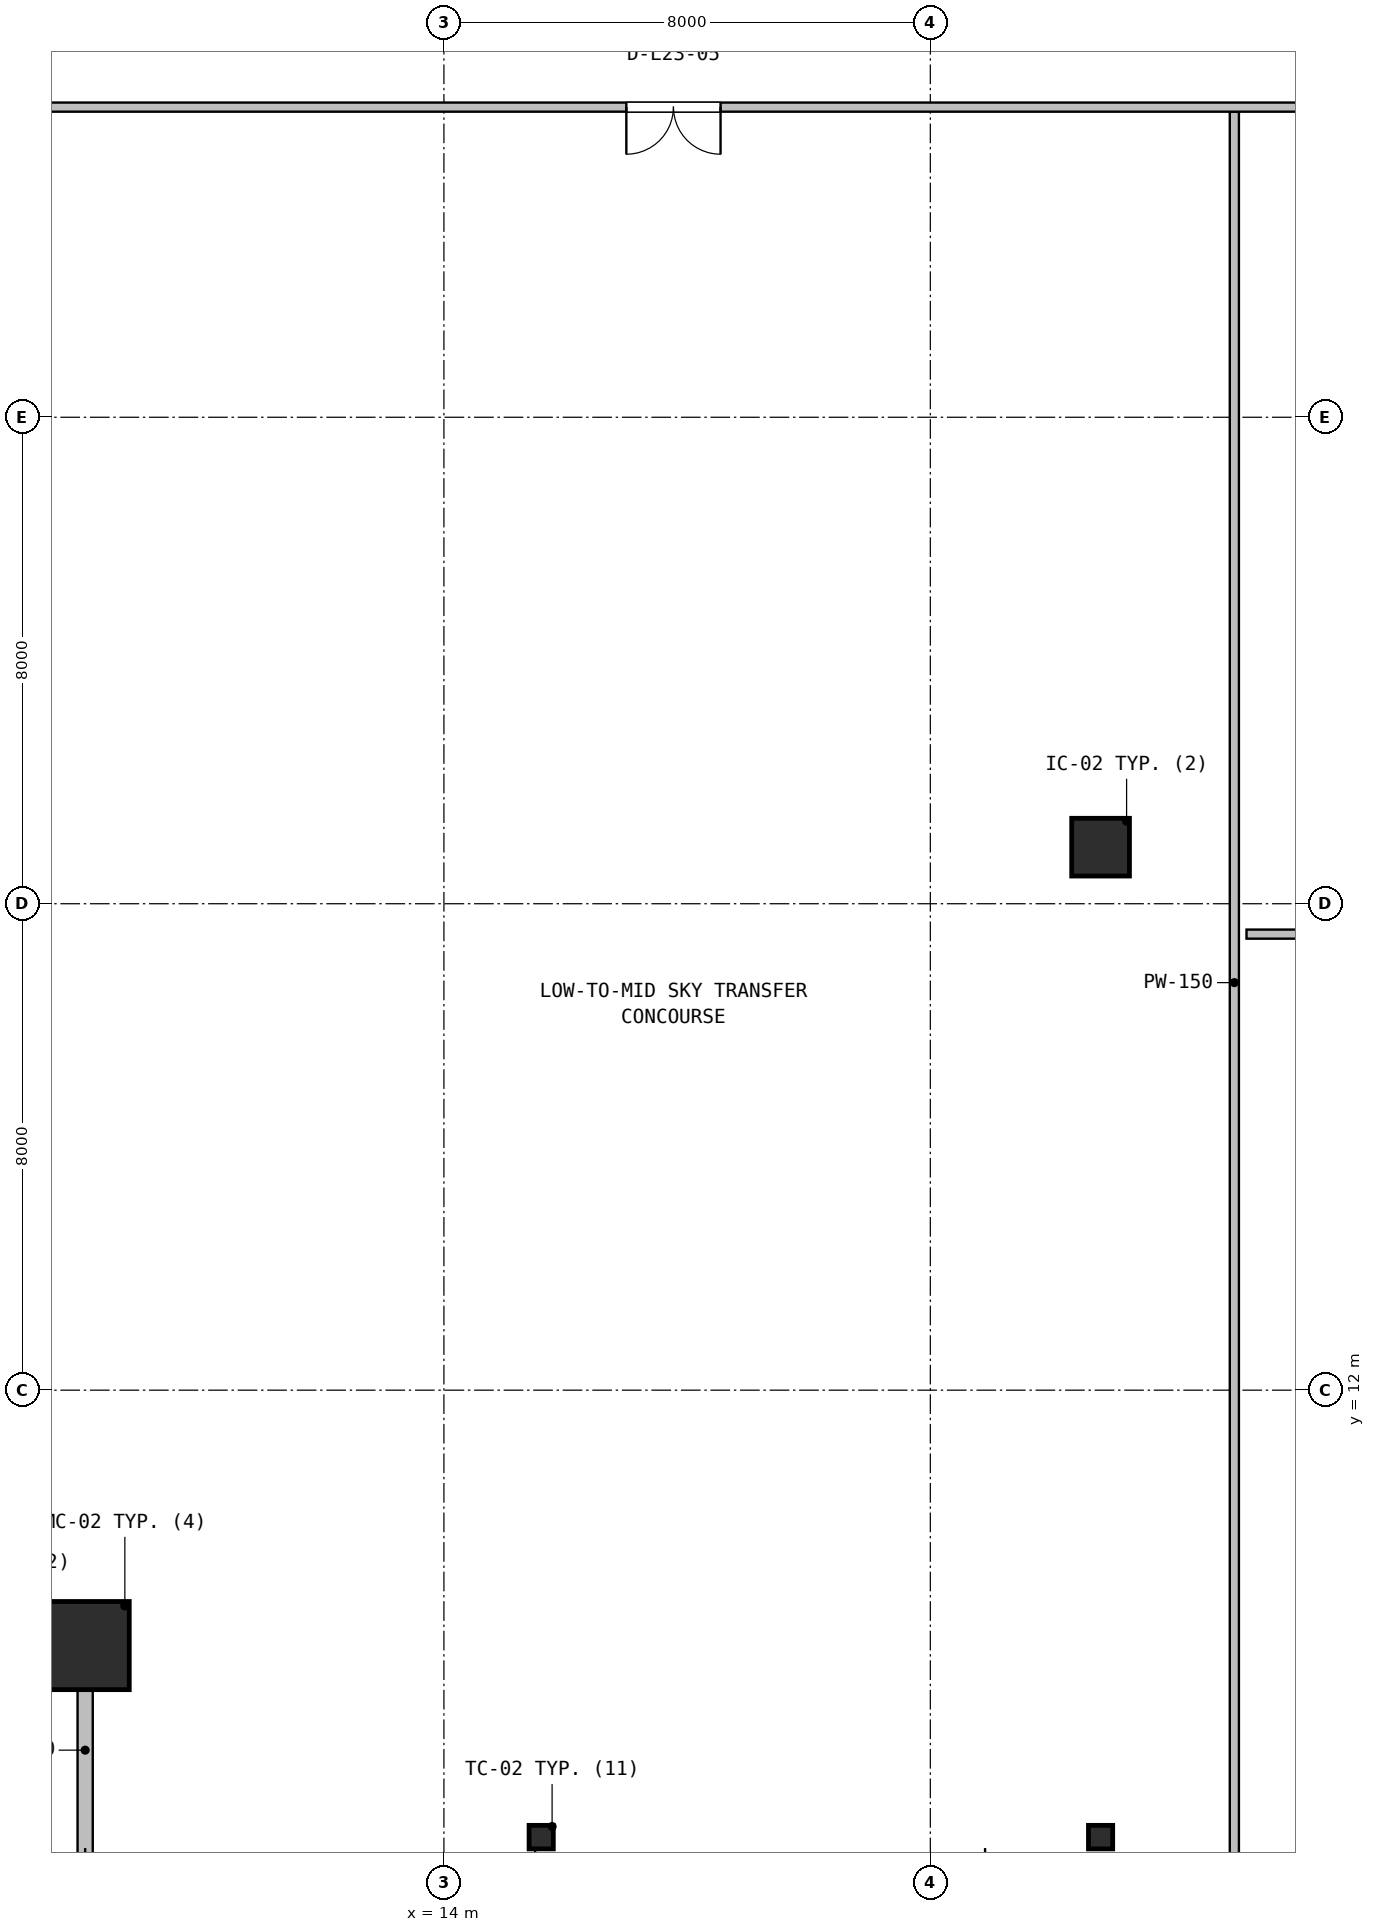
"""IFC4 building model, lengths in metres.
Left out: names, types, materials, properties, quantities, classifications, styles, units other than length and angle.
Written with IfcOpenShell. Run it as: python <this file> out.ifc"""

import sys

from ifc_helpers import new_model, si_unit, direction, frame, frame_2d, origin, origin_2d, place, context, subcontext, project, spatial, rectangle, hollow_rectangle, i_section, extrude, source, transform, mapped, element, fill, save


model = new_model("IFC4")
c1 = context("Model", 3, precision=1e-05, world=origin(), true_north=direction((0.0, 1.0)))
c2 = subcontext(c1, "Body", "Model", "MODEL_VIEW")
j1 = project(units=[si_unit("LENGTHUNIT", "METRE"), si_unit("PLANEANGLEUNIT", "RADIAN")], contexts=[c1])
p1 = place(None, origin())
s1 = spatial("IfcSite", under=j1, at=p1, CompositionType="ELEMENT")
p2 = place(p1, origin())
s2 = spatial("IfcBuilding", under=s1, at=p2, CompositionType="ELEMENT")
p3 = place(p2, frame((0.0, 0.0, 98.4)))
s3 = spatial("IfcBuildingStorey", under=s2, at=p3, CompositionType="ELEMENT", Elevation=98.4)
m1 = source(origin(), c2, "Body", "SweptSolid", [
    extrude(hollow_rectangle(XDim=1.45, YDim=1.45, WallThickness=0.055, at=origin_2d()), origin(), (0.0, 0.0, 1.0), 4.6),
])
p4 = place(p3, frame((8.1, 7.8, 0.0), z_axis=(0.0, 0.0, 1.0), x_axis=(1.0, 0.0, 0.0)))
e1 = element("IfcColumn", 1, at=p4, inside=s3, PredefinedType="COLUMN", context=c2, shape_type="MappedRepresentation", body=[
    mapped(m1, transform((0.0, 0.0, 0.0), x_axis=(1.0, 0.0, 0.0), y_axis=(0.0, 1.0, 0.0), z_axis=(0.0, 0.0, 1.0), scale=1.0)),
])
m2 = source(origin(), c2, "Body", "SweptSolid", [
    extrude(i_section(OverallWidth=0.398, OverallDepth=0.387, WebThickness=0.021, FlangeThickness=0.033, FilletRadius=0.018, at=origin_2d()), origin(), (0.0, 0.0, 1.0), 4.6),
])
for number, where, z_axis, x_axis in (
    (2, (15.6, 4.65, 0.0), (0.0, 0.0, 1.0), (1.0, 0.0, 0.0)),
    (3, (24.8, 4.65, 0.0), (0.0, 0.0, 1.0), (1.0, 0.0, 0.0)),
):
    element("IfcColumn", number, at=place(p3, frame(where, z_axis=z_axis, x_axis=x_axis)), inside=s3, PredefinedType="COLUMN", context=c2, shape_type="MappedRepresentation", body=[
        mapped(m2, transform((0.0, 0.0, 0.0), x_axis=(1.0, 0.0, 0.0), y_axis=(0.0, 1.0, 0.0), z_axis=(0.0, 0.0, 1.0), scale=1.0)),
    ])
m3 = source(origin(), c2, "Body", "SweptSolid", [
    extrude(rectangle(XDim=0.95, YDim=0.95, at=origin_2d()), origin(), (0.0, 0.0, 1.0), 4.6),
])
p5 = place(p3, frame((24.8, 20.93, 0.0), z_axis=(0.0, 0.0, 1.0), x_axis=(1.0, 0.0, 0.0)))
e4 = element("IfcColumn", 4, at=p5, inside=s3, PredefinedType="COLUMN", context=c2, shape_type="MappedRepresentation", body=[
    mapped(m3, transform((0.0, 0.0, 0.0), x_axis=(1.0, 0.0, 0.0), y_axis=(0.0, 1.0, 0.0), z_axis=(0.0, 0.0, 1.0), scale=1.0)),
])
p6 = place(p3, frame((8.1, 4.28, 0.0), z_axis=(0.0, 0.0, 1.0), x_axis=(0.0, 1.0, 0.0)))
e5 = element("IfcWall", 5, at=p6, inside=s3, PredefinedType="SOLIDWALL", context=c2, shape_type="SweptSolid", body=[
    extrude(rectangle(XDim=3.6, YDim=0.25, at=frame_2d((1.8, 0.0))), origin(), (0.0, 0.0, 1.0), 3.908),
])
p7 = place(p3, frame((27.0, 4.38, 0.0), z_axis=(0.0, 0.0, 1.0), x_axis=(0.0, 1.0, 0.0)))
e6 = element("IfcWall", 6, at=p7, inside=s3, PredefinedType="PARTITIONING", context=c2, shape_type="SweptSolid", body=[
    extrude(rectangle(XDim=28.645, YDim=0.15, at=frame_2d((14.323, 0.0))), origin(), (0.0, 0.0, 1.0), 3.63),
])
p8 = place(p3, frame((4.68, 33.1, 0.0), z_axis=(0.0, 0.0, 1.0), x_axis=(1.0, 0.0, 0.0)))
e7 = element("IfcWall", 7, at=p8, inside=s3, PredefinedType="PARTITIONING", context=c2, shape_type="SweptSolid", body=[
    extrude(rectangle(XDim=34.92, YDim=0.15, at=frame_2d((17.46, 0.0))), origin(), (0.0, 0.0, 1.0), 3.63),
])
p9 = place(p8, frame((12.32, 0.0, 0.0)))
e8 = element("IfcOpeningElement", 8, at=p9, cuts=e7, PredefinedType="OPENING", context=c2, shape_type="SweptSolid", body=[
    extrude(rectangle(XDim=1.55, YDim=2.12, at=frame_2d((0.775, 1.06))), frame((0.0, 0.085, 0.0), z_axis=(0.0, -1.0, 0.0), x_axis=(1.0, 0.0, 0.0)), (0.0, 0.0, 1.0), 0.17),
])
p10 = place(p3, frame((27.2, 19.5, 0.0), z_axis=(0.0, 0.0, 1.0), x_axis=(1.0, 0.0, 0.0)))
e9 = element("IfcWall", 9, at=p10, inside=s3, PredefinedType="PARTITIONING", context=c2, shape_type="SweptSolid", body=[
    extrude(rectangle(XDim=12.4, YDim=0.15, at=frame_2d((6.2, 0.0))), origin(), (0.0, 0.0, 1.0), 3.63),
])
m4 = source(origin(), c2, "Body", "SweptSolid", [
    extrude(rectangle(XDim=1.55, YDim=2.12, at=frame_2d((0.775, 1.06))), frame((0.0, 0.025, 0.0), z_axis=(0.0, -1.0, 0.0), x_axis=(1.0, 0.0, 0.0)), (0.0, 0.0, 1.0), 0.05),
])
p11 = place(p9, frame((1.55, 0.0, 0.0), z_axis=(0.0, 0.0, 1.0), x_axis=(-1.0, 0.0, 0.0)))
e10 = element("IfcDoor", 10, at=p11, inside=s3, OperationType="DOUBLE_DOOR_SINGLE_SWING", PredefinedType="DOOR", context=c2, shape_type="MappedRepresentation", body=[
    mapped(m4, transform((0.0, 0.0, 0.0), x_axis=(1.0, 0.0, 0.0), y_axis=(0.0, 1.0, 0.0), z_axis=(0.0, 0.0, 1.0), scale=1.0)),
])
fill(e8, e10)
save(model, sys.argv[1])
